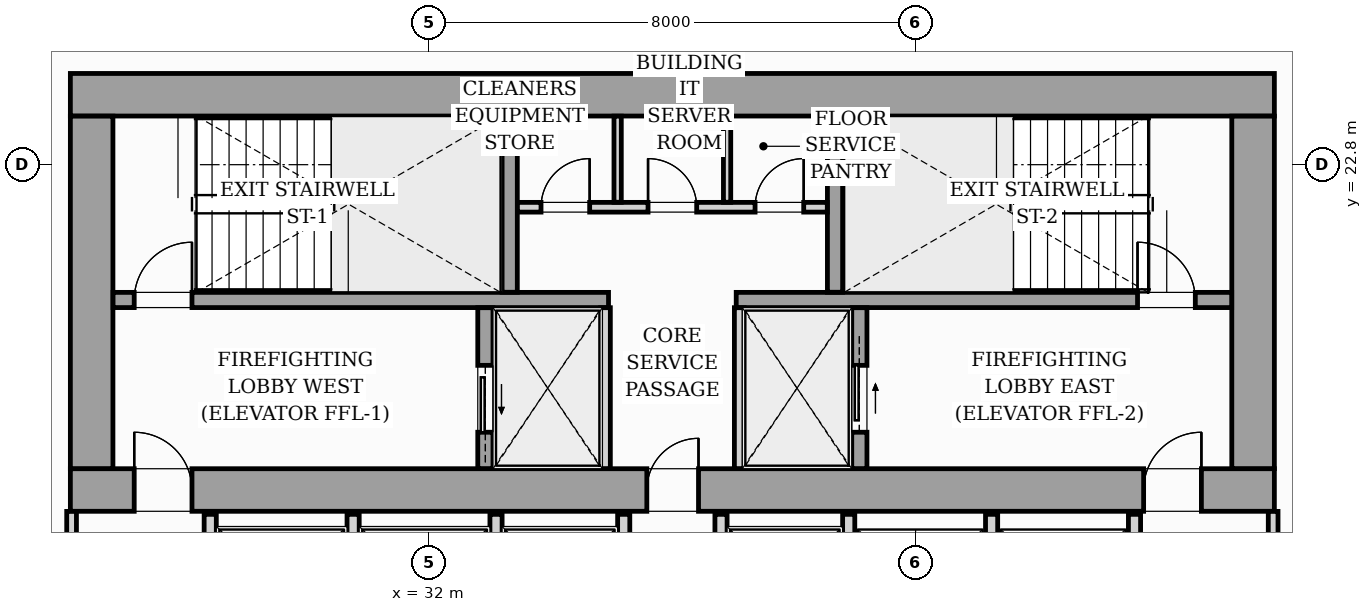
"""IFC4 building model, lengths in metres.
Left out: names, types, materials, properties, quantities, classifications, styles, units other than length and angle.
Written with IfcOpenShell. Run it as: python <this file> out.ifc"""

import sys

from ifc_helpers import new_model, si_unit, direction, frame, frame_2d, origin, origin_2d, place, context, subcontext, project, spatial, rectangle, i_section, extrude, source, transform, mapped, element, fill, save


model = new_model("IFC4")
c1 = context("Model", 3, precision=1e-05, world=origin(), true_north=direction((0.0, 1.0)))
c2 = subcontext(c1, "Body", "Model", "MODEL_VIEW")
j1 = project(units=[si_unit("LENGTHUNIT", "METRE"), si_unit("PLANEANGLEUNIT", "RADIAN")], contexts=[c1])
p1 = place(None, origin())
s1 = spatial("IfcSite", under=j1, at=p1, CompositionType="ELEMENT")
p2 = place(p1, origin())
s2 = spatial("IfcBuilding", under=s1, at=p2, CompositionType="ELEMENT")
p3 = place(p2, frame((0.0, 0.0, 97.0)))
s3 = spatial("IfcBuildingStorey", under=s2, at=p3, CompositionType="ELEMENT", Elevation=97.0)
m1 = source(origin(), c2, "Body", "SweptSolid", [
    extrude(i_section(OverallWidth=0.427, OverallDepth=0.483, WebThickness=0.051, FlangeThickness=0.082, FilletRadius=0.018, at=origin_2d()), origin(), (0.0, 0.0, 1.0), 3.196),
])
for number, where, z_axis, x_axis in (
    (1, (26.4, 17.4, 0.002), (0.0, 0.0, 1.0), (1.0, 0.0, 0.0)),
    (2, (33.12, 17.4, 0.002), (0.0, 0.0, 1.0), (1.0, 0.0, 0.0)),
    (3, (38.88, 17.4, 0.002), (0.0, 0.0, 1.0), (1.0, 0.0, 0.0)),
    (4, (45.6, 17.4, 0.002), (0.0, 0.0, 1.0), (1.0, 0.0, 0.0)),
    (5, (26.4, 24.0, 0.002), (0.0, 0.0, 1.0), (1.0, 0.0, 0.0)),
    (6, (33.12, 24.0, 0.002), (0.0, 0.0, 1.0), (1.0, 0.0, 0.0)),
    (7, (38.88, 24.0, 0.002), (0.0, 0.0, 1.0), (1.0, 0.0, 0.0)),
    (8, (45.6, 24.0, 0.002), (0.0, 0.0, 1.0), (1.0, 0.0, 0.0)),
):
    element("IfcColumn", number, at=place(p3, frame(where, z_axis=z_axis, x_axis=x_axis)), inside=s3, PredefinedType="PILASTER", context=c2, shape_type="MappedRepresentation", body=[
        mapped(m1, transform((0.0, 0.0, 0.0), scale=1.0)),
    ])
p4 = place(p3, frame((11.08, 23.508, 0.0), z_axis=(0.0, 0.0, 1.0), x_axis=(0.995396638587, 0.095841180552, 0.0)))
e9 = element("IfcWall", 9, at=p4, inside=s3, PredefinedType="STANDARD", context=c2, shape_type="SweptSolid", body=[
    extrude(rectangle(XDim=19.11, YDim=0.26, at=frame_2d((9.555, 0.0))), origin(), (0.0, 0.0, 1.0), 2.94),
])
p5 = place(p4, frame((7.726, 0.0, 0.0)))
e10 = element("IfcOpeningElement", 10, at=p5, cuts=e9, PredefinedType="OPENING", context=c2, shape_type="SweptSolid", body=[
    extrude(rectangle(XDim=1.8, YDim=2.06, at=frame_2d((0.9, 1.03))), frame((0.0, 0.14, 0.0), z_axis=(0.0, -1.0, 0.0), x_axis=(1.0, 0.0, 0.0)), (0.0, 0.0, 1.0), 0.28),
])
p6 = place(p4, frame((2.05, 0.0, 0.65)))
e11 = element("IfcOpeningElement", 11, at=p6, cuts=e9, PredefinedType="OPENING", context=c2, shape_type="SweptSolid", body=[
    extrude(rectangle(XDim=1.6, YDim=1.5, at=frame_2d((0.8, 0.75))), frame((0.0, 0.14, 0.0), z_axis=(0.0, -1.0, 0.0), x_axis=(1.0, 0.0, 0.0)), (0.0, 0.0, 1.0), 0.28),
])
p7 = place(p3, frame((26.1, 17.45, 0.0), z_axis=(0.0, 0.0, 1.0), x_axis=(1.0, 0.0, 0.0)))
e12 = element("IfcWall", 12, at=p7, inside=s3, PredefinedType="SHEAR", context=c2, shape_type="SweptSolid", body=[
    extrude(rectangle(XDim=19.8, YDim=0.7, at=frame_2d((9.9, 0.0))), origin(), (0.0, 0.0, 1.0), 3.2),
])
p8 = place(p7, frame((1.05, 0.0, 0.0)))
e13 = element("IfcOpeningElement", 13, at=p8, cuts=e12, PredefinedType="OPENING", context=c2, shape_type="SweptSolid", body=[
    extrude(rectangle(XDim=0.95, YDim=2.06, at=frame_2d((0.475, 1.03))), frame((0.0, 0.36, 0.0), z_axis=(0.0, -1.0, 0.0), x_axis=(1.0, 0.0, 0.0)), (0.0, 0.0, 1.0), 0.72),
])
p9 = place(p7, frame((9.48, 0.0, 0.0)))
e14 = element("IfcOpeningElement", 14, at=p9, cuts=e12, PredefinedType="OPENING", context=c2, shape_type="SweptSolid", body=[
    extrude(rectangle(XDim=0.85, YDim=2.0, at=frame_2d((0.425, 1.0))), frame((0.0, 0.36, 0.0), z_axis=(0.0, -1.0, 0.0), x_axis=(1.0, 0.0, 0.0)), (0.0, 0.0, 1.0), 0.72),
])
p10 = place(p7, frame((17.65, 0.0, 0.0)))
e15 = element("IfcOpeningElement", 15, at=p10, cuts=e12, PredefinedType="OPENING", context=c2, shape_type="SweptSolid", body=[
    extrude(rectangle(XDim=0.95, YDim=2.06, at=frame_2d((0.475, 1.03))), frame((0.0, 0.36, 0.0), z_axis=(0.0, -1.0, 0.0), x_axis=(1.0, 0.0, 0.0)), (0.0, 0.0, 1.0), 0.72),
])
p11 = place(p3, frame((26.1, 23.95, 0.0), z_axis=(0.0, 0.0, 1.0), x_axis=(1.0, 0.0, 0.0)))
e16 = element("IfcWall", 16, at=p11, inside=s3, PredefinedType="SHEAR", context=c2, shape_type="SweptSolid", body=[
    extrude(rectangle(XDim=19.8, YDim=0.7, at=frame_2d((9.9, 0.0))), origin(), (0.0, 0.0, 1.0), 3.2),
])
for number, where, z_axis, x_axis in (
    (17, (26.45, 17.802, 0.0), (0.0, 0.0, 1.0), (0.0, 1.0, 0.0)),
    (18, (45.55, 17.802, 0.0), (0.0, 0.0, 1.0), (0.0, 1.0, 0.0)),
):
    element("IfcWall", number, at=place(p3, frame(where, z_axis=z_axis, x_axis=x_axis)), inside=s3, PredefinedType="SHEAR", context=c2, shape_type="SweptSolid", body=[
        extrude(rectangle(XDim=5.796, YDim=0.7, at=frame_2d((2.898, 0.0))), origin(), (0.0, 0.0, 1.0), 3.2),
    ])
p12 = place(p3, frame((26.802, 20.575, 0.0), z_axis=(0.0, 0.0, 1.0), x_axis=(1.0, 0.0, 0.0)))
e19 = element("IfcWall", 19, at=p12, inside=s3, PredefinedType="SOLIDWALL", context=c2, shape_type="SweptSolid", body=[
    extrude(rectangle(XDim=8.148, YDim=0.25, at=frame_2d((4.074, 0.0))), origin(), (0.0, 0.0, 1.0), 3.2),
])
p13 = place(p12, frame((0.348, 0.0, 0.0)))
e20 = element("IfcOpeningElement", 20, at=p13, cuts=e19, PredefinedType="OPENING", context=c2, shape_type="SweptSolid", body=[
    extrude(rectangle(XDim=0.95, YDim=2.06, at=frame_2d((0.475, 1.03))), frame((0.0, 0.135, 0.0), z_axis=(0.0, -1.0, 0.0), x_axis=(1.0, 0.0, 0.0)), (0.0, 0.0, 1.0), 0.27),
])
p14 = place(p3, frame((37.05, 20.575, 0.0), z_axis=(0.0, 0.0, 1.0), x_axis=(1.0, 0.0, 0.0)))
e21 = element("IfcWall", 21, at=p14, inside=s3, PredefinedType="SOLIDWALL", context=c2, shape_type="SweptSolid", body=[
    extrude(rectangle(XDim=8.148, YDim=0.25, at=frame_2d((4.074, 0.0))), origin(), (0.0, 0.0, 1.0), 3.2),
])
p15 = place(p14, frame((6.6, 0.0, 0.0)))
e22 = element("IfcOpeningElement", 22, at=p15, cuts=e21, PredefinedType="OPENING", context=c2, shape_type="SweptSolid", body=[
    extrude(rectangle(XDim=0.95, YDim=2.06, at=frame_2d((0.475, 1.03))), frame((0.0, 0.135, 0.0), z_axis=(0.0, -1.0, 0.0), x_axis=(1.0, 0.0, 0.0)), (0.0, 0.0, 1.0), 0.27),
])
for number, where, z_axis, x_axis in (
    (23, (33.325, 20.702, 0.0), (0.0, 0.0, 1.0), (0.0, 1.0, 0.0)),
    (24, (38.675, 20.702, 0.0), (0.0, 0.0, 1.0), (0.0, 1.0, 0.0)),
):
    element("IfcWall", number, at=place(p3, frame(where, z_axis=z_axis, x_axis=x_axis)), inside=s3, PredefinedType="SOLIDWALL", context=c2, shape_type="SweptSolid", body=[
        extrude(rectangle(XDim=2.896, YDim=0.25, at=frame_2d((1.448, 0.0))), origin(), (0.0, 0.0, 1.0), 3.2),
    ])
p16 = place(p3, frame((32.925, 17.802, 0.0), z_axis=(0.0, 0.0, 1.0), x_axis=(0.0, 1.0, 0.0)))
e25 = element("IfcWall", 25, at=p16, inside=s3, PredefinedType="SOLIDWALL", context=c2, shape_type="SweptSolid", body=[
    extrude(rectangle(XDim=2.646, YDim=0.25, at=frame_2d((1.323, 0.0))), origin(), (0.0, 0.0, 1.0), 3.2),
])
p17 = place(p16, frame((0.598, 0.0, 0.0)))
e26 = element("IfcOpeningElement", 26, at=p17, cuts=e25, PredefinedType="OPENING", context=c2, shape_type="SweptSolid", body=[
    extrude(rectangle(XDim=1.1, YDim=2.08, at=frame_2d((0.55, 1.04))), frame((0.0, 0.135, 0.0), z_axis=(0.0, -1.0, 0.0), x_axis=(1.0, 0.0, 0.0)), (0.0, 0.0, 1.0), 0.27),
])
for number, where, z_axis, x_axis in (
    (27, (34.9, 17.802, 0.0), (0.0, 0.0, 1.0), (0.0, 1.0, 0.0)),
    (28, (37.1, 17.802, 0.0), (0.0, 0.0, 1.0), (0.0, 1.0, 0.0)),
):
    element("IfcWall", number, at=place(p3, frame(where, z_axis=z_axis, x_axis=x_axis)), inside=s3, PredefinedType="PARTITIONING", context=c2, shape_type="SweptSolid", body=[
        extrude(rectangle(XDim=2.646, YDim=0.16, at=frame_2d((1.323, 0.0))), origin(), (0.0, 0.0, 1.0), 2.94),
    ])
p18 = place(p3, frame((39.075, 17.802, 0.0), z_axis=(0.0, 0.0, 1.0), x_axis=(0.0, 1.0, 0.0)))
e29 = element("IfcWall", 29, at=p18, inside=s3, PredefinedType="SOLIDWALL", context=c2, shape_type="SweptSolid", body=[
    extrude(rectangle(XDim=2.646, YDim=0.25, at=frame_2d((1.323, 0.0))), origin(), (0.0, 0.0, 1.0), 3.2),
])
p19 = place(p18, frame((0.598, 0.0, 0.0)))
e30 = element("IfcOpeningElement", 30, at=p19, cuts=e29, PredefinedType="OPENING", context=c2, shape_type="SweptSolid", body=[
    extrude(rectangle(XDim=1.1, YDim=2.08, at=frame_2d((0.55, 1.04))), frame((0.0, 0.135, 0.0), z_axis=(0.0, -1.0, 0.0), x_axis=(1.0, 0.0, 0.0)), (0.0, 0.0, 1.0), 0.27),
])
p20 = place(p3, frame((33.452, 22.1, 0.0), z_axis=(0.0, 0.0, 1.0), x_axis=(1.0, 0.0, 0.0)))
e31 = element("IfcWall", 31, at=p20, inside=s3, PredefinedType="PARTITIONING", context=c2, shape_type="SweptSolid", body=[
    extrude(rectangle(XDim=5.096, YDim=0.16, at=frame_2d((2.548, 0.0))), origin(), (0.0, 0.0, 1.0), 2.94),
])
p21 = place(p20, frame((0.388, 0.0, 0.0)))
e32 = element("IfcOpeningElement", 32, at=p21, cuts=e31, PredefinedType="OPENING", context=c2, shape_type="SweptSolid", body=[
    extrude(rectangle(XDim=0.8, YDim=2.05, at=frame_2d((0.4, 1.025))), frame((0.0, 0.09, 0.0), z_axis=(0.0, -1.0, 0.0), x_axis=(1.0, 0.0, 0.0)), (0.0, 0.0, 1.0), 0.18),
])
p22 = place(p20, frame((2.148, 0.0, 0.0)))
e33 = element("IfcOpeningElement", 33, at=p22, cuts=e31, PredefinedType="OPENING", context=c2, shape_type="SweptSolid", body=[
    extrude(rectangle(XDim=0.8, YDim=2.05, at=frame_2d((0.4, 1.025))), frame((0.0, 0.09, 0.0), z_axis=(0.0, -1.0, 0.0), x_axis=(1.0, 0.0, 0.0)), (0.0, 0.0, 1.0), 0.18),
])
p23 = place(p20, frame((3.908, 0.0, 0.0)))
e34 = element("IfcOpeningElement", 34, at=p23, cuts=e31, PredefinedType="OPENING", context=c2, shape_type="SweptSolid", body=[
    extrude(rectangle(XDim=0.8, YDim=2.05, at=frame_2d((0.4, 1.025))), frame((0.0, 0.09, 0.0), z_axis=(0.0, -1.0, 0.0), x_axis=(1.0, 0.0, 0.0)), (0.0, 0.0, 1.0), 0.18),
])
for number, where, z_axis, x_axis in (
    (35, (35.1, 22.182, 0.0), (0.0, 0.0, 1.0), (0.0, 1.0, 0.0)),
    (36, (36.9, 22.182, 0.0), (0.0, 0.0, 1.0), (0.0, 1.0, 0.0)),
):
    element("IfcWall", number, at=place(p3, frame(where, z_axis=z_axis, x_axis=x_axis)), inside=s3, PredefinedType="PARTITIONING", context=c2, shape_type="SweptSolid", body=[
        extrude(rectangle(XDim=1.416, YDim=0.12, at=frame_2d((0.708, 0.0))), origin(), (0.0, 0.0, 1.0), 2.94),
    ])
for number, where, z_axis, x_axis in (
    (37, (28.4, 14.75, 0.0), (0.0, 0.0, 1.0), (0.0, 1.0, 0.0)),
    (38, (30.75, 14.75, 0.0), (0.0, 0.0, 1.0), (0.0, 1.0, 0.0)),
    (39, (33.1, 14.75, 0.0), (0.0, 0.0, 1.0), (0.0, 1.0, 0.0)),
    (40, (35.2, 14.75, 0.0), (0.0, 0.0, 1.0), (0.0, 1.0, 0.0)),
    (41, (36.8, 14.75, 0.0), (0.0, 0.0, 1.0), (0.0, 1.0, 0.0)),
    (42, (38.9, 14.75, 0.0), (0.0, 0.0, 1.0), (0.0, 1.0, 0.0)),
    (43, (41.25, 14.75, 0.0), (0.0, 0.0, 1.0), (0.0, 1.0, 0.0)),
    (44, (43.6, 14.75, 0.0), (0.0, 0.0, 1.0), (0.0, 1.0, 0.0)),
):
    element("IfcWall", number, at=place(p3, frame(where, z_axis=z_axis, x_axis=x_axis)), inside=s3, PredefinedType="PARTITIONING", context=c2, shape_type="SweptSolid", body=[
        extrude(rectangle(XDim=2.3, YDim=0.2, at=frame_2d((1.15, 0.0))), origin(), (0.0, 0.0, 1.0), 2.94),
    ])
p24 = place(p3, frame((36.0, 24.302, 0.0), z_axis=(0.0, 0.0, 1.0), x_axis=(0.0, 1.0, 0.0)))
e45 = element("IfcWall", 45, at=p24, inside=s3, PredefinedType="PARTITIONING", context=c2, shape_type="SweptSolid", body=[
    extrude(rectangle(XDim=1.656, YDim=0.2, at=frame_2d((0.828, 0.0))), origin(), (0.0, 0.0, 1.0), 2.94),
])
for number, where, z_axis, x_axis in (
    (46, (26.12, 14.762, 0.0), (0.0, 0.0, 1.0), (0.0, 1.0, 0.0)),
    (47, (45.88, 14.762, 0.0), (0.0, 0.0, 1.0), (0.0, 1.0, 0.0)),
):
    element("IfcWall", number, at=place(p3, frame(where, z_axis=z_axis, x_axis=x_axis)), inside=s3, PredefinedType="PARTITIONING", context=c2, shape_type="SweptSolid", body=[
        extrude(rectangle(XDim=2.336, YDim=0.16, at=frame_2d((1.168, 0.0))), origin(), (0.0, 0.0, 1.0), 2.94),
    ])
m2 = source(origin(), c2, "Body", "SweptSolid", [
    extrude(rectangle(XDim=0.95, YDim=2.06, at=frame_2d((0.475, 1.03))), frame((0.0, 0.025, 0.0), z_axis=(0.0, -1.0, 0.0), x_axis=(1.0, 0.0, 0.0)), (0.0, 0.0, 1.0), 0.05),
])
p25 = place(p8, origin())
e48 = element("IfcDoor", 48, at=p25, inside=s3, OperationType="SINGLE_SWING_LEFT", PredefinedType="DOOR", context=c2, shape_type="MappedRepresentation", body=[
    mapped(m2, transform((0.0, 0.0, 0.0), scale=1.0)),
])
fill(e13, e48)
m3 = source(origin(), c2, "Body", "SweptSolid", [
    extrude(rectangle(XDim=0.85, YDim=2.0, at=frame_2d((0.425, 1.0))), frame((0.0, 0.025, 0.0), z_axis=(0.0, -1.0, 0.0), x_axis=(1.0, 0.0, 0.0)), (0.0, 0.0, 1.0), 0.05),
])
p26 = place(p9, origin())
e49 = element("IfcDoor", 49, at=p26, inside=s3, OperationType="SINGLE_SWING_RIGHT", PredefinedType="DOOR", context=c2, shape_type="MappedRepresentation", body=[
    mapped(m3, transform((0.0, 0.0, 0.0), scale=1.0)),
])
fill(e14, e49)
p27 = place(p10, origin())
e50 = element("IfcDoor", 50, at=p27, inside=s3, OperationType="SINGLE_SWING_RIGHT", PredefinedType="DOOR", context=c2, shape_type="MappedRepresentation", body=[
    mapped(m2, transform((0.0, 0.0, 0.0), scale=1.0)),
])
fill(e15, e50)
p28 = place(p13, origin())
e51 = element("IfcDoor", 51, at=p28, inside=s3, OperationType="SINGLE_SWING_RIGHT", PredefinedType="DOOR", context=c2, shape_type="MappedRepresentation", body=[
    mapped(m2, transform((0.0, 0.0, 0.0), scale=1.0)),
])
fill(e20, e51)
p29 = place(p15, origin())
e52 = element("IfcDoor", 52, at=p29, inside=s3, OperationType="SINGLE_SWING_LEFT", PredefinedType="DOOR", context=c2, shape_type="MappedRepresentation", body=[
    mapped(m2, transform((0.0, 0.0, 0.0), scale=1.0)),
])
fill(e22, e52)
m4 = source(origin(), c2, "Body", "SweptSolid", [
    extrude(rectangle(XDim=1.1, YDim=2.08, at=frame_2d((0.55, 1.04))), frame((0.0, 0.025, 0.0), z_axis=(0.0, -1.0, 0.0), x_axis=(1.0, 0.0, 0.0)), (0.0, 0.0, 1.0), 0.05),
])
p30 = place(p17, origin())
e53 = element("IfcDoor", 53, at=p30, inside=s3, OperationType="SLIDING_TO_LEFT", PredefinedType="DOOR", context=c2, shape_type="MappedRepresentation", body=[
    mapped(m4, transform((0.0, 0.0, 0.0), scale=1.0)),
])
fill(e26, e53)
p31 = place(p19, origin())
e54 = element("IfcDoor", 54, at=p31, inside=s3, OperationType="SLIDING_TO_RIGHT", PredefinedType="DOOR", context=c2, shape_type="MappedRepresentation", body=[
    mapped(m4, transform((0.0, 0.0, 0.0), scale=1.0)),
])
fill(e30, e54)
m5 = source(origin(), c2, "Body", "SweptSolid", [
    extrude(rectangle(XDim=0.8, YDim=2.05, at=frame_2d((0.4, 1.025))), frame((0.0, 0.025, 0.0), z_axis=(0.0, -1.0, 0.0), x_axis=(1.0, 0.0, 0.0)), (0.0, 0.0, 1.0), 0.05),
])
p32 = place(p21, origin())
e55 = element("IfcDoor", 55, at=p32, inside=s3, OperationType="SINGLE_SWING_RIGHT", PredefinedType="DOOR", context=c2, shape_type="MappedRepresentation", body=[
    mapped(m5, transform((0.0, 0.0, 0.0), scale=1.0)),
])
fill(e32, e55)
p33 = place(p22, origin())
e56 = element("IfcDoor", 56, at=p33, inside=s3, OperationType="SINGLE_SWING_LEFT", PredefinedType="DOOR", context=c2, shape_type="MappedRepresentation", body=[
    mapped(m5, transform((0.0, 0.0, 0.0), scale=1.0)),
])
fill(e33, e56)
p34 = place(p23, origin())
e57 = element("IfcDoor", 57, at=p34, inside=s3, OperationType="SINGLE_SWING_RIGHT", PredefinedType="DOOR", context=c2, shape_type="MappedRepresentation", body=[
    mapped(m5, transform((0.0, 0.0, 0.0), scale=1.0)),
])
fill(e34, e57)
save(model, sys.argv[1])
